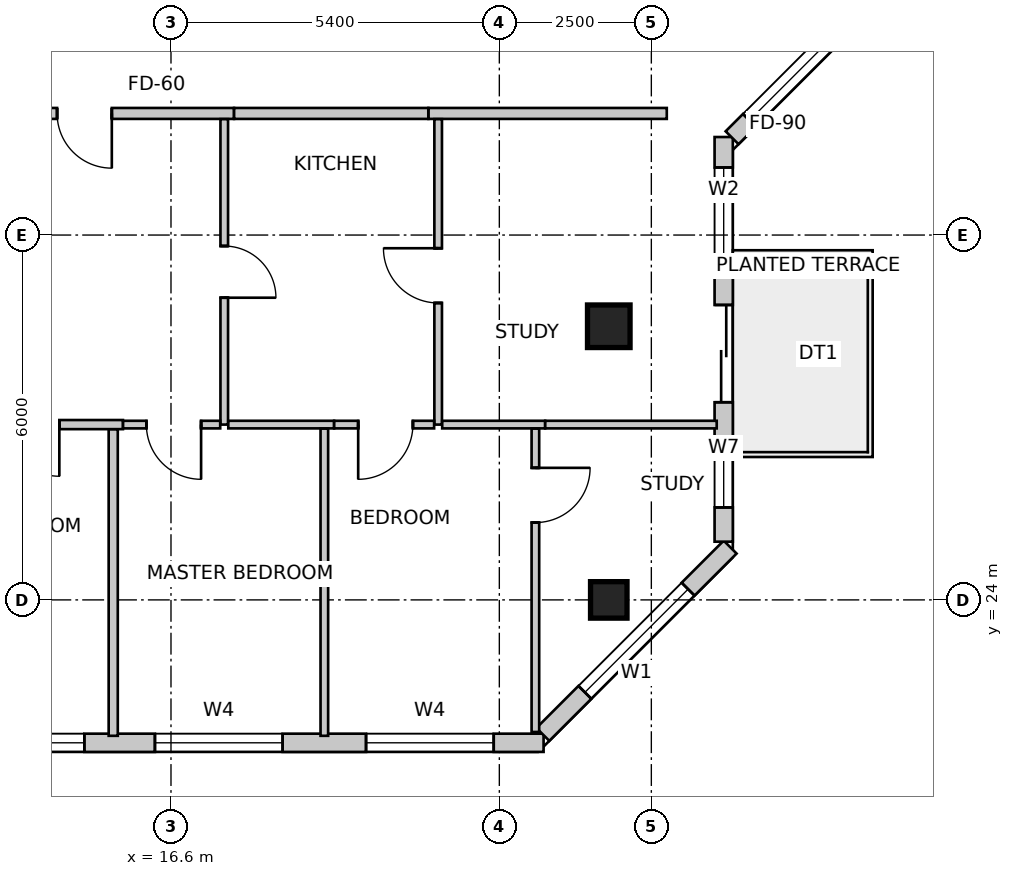
"""IFC4 building model, lengths in metres.
Left out: names, types, materials, properties, quantities, classifications, styles, units other than length and angle.
Written with IfcOpenShell. Run it as: python <this file> out.ifc"""

import sys

from ifc_helpers import new_model, si_unit, direction, frame, frame_2d, origin, origin_2d, place, context, subcontext, project, spatial, rectangle, extrude, source, transform, mapped, element, fill, save


model = new_model("IFC4")
c1 = context("Model", 3, precision=1e-05, world=origin(), true_north=direction((0.0, 1.0)))
c2 = subcontext(c1, "Body", "Model", "MODEL_VIEW")
j1 = project(units=[si_unit("LENGTHUNIT", "METRE"), si_unit("PLANEANGLEUNIT", "RADIAN")], contexts=[c1])
p1 = place(None, origin())
s1 = spatial("IfcSite", under=j1, at=p1, CompositionType="ELEMENT")
p2 = place(p1, origin())
s2 = spatial("IfcBuilding", under=s1, at=p2, CompositionType="ELEMENT")
p3 = place(p2, frame((0.0, 0.0, 285.3)))
s3 = spatial("IfcBuildingStorey", under=s2, at=p3, CompositionType="ELEMENT", Elevation=285.3)
m1 = source(origin(), c2, "Body", "SweptSolid", [
    extrude(rectangle(XDim=0.7, YDim=0.7, at=origin_2d()), origin(), (0.0, 0.0, 1.0), 3.6),
])
p4 = place(p3, frame((23.8, 28.5, 0.0), z_axis=(0.0, 0.0, 1.0), x_axis=(1.0, 0.0, 0.0)))
e1 = element("IfcColumn", 1, at=p4, inside=s3, PredefinedType="COLUMN", context=c2, shape_type="MappedRepresentation", body=[
    mapped(m1, transform((0.0, 0.0, 0.0), scale=1.0)),
])
m2 = source(origin(), c2, "Body", "SweptSolid", [
    extrude(rectangle(XDim=0.6, YDim=0.6, at=origin_2d()), origin(), (0.0, 0.0, 1.0), 3.6),
])
p5 = place(p3, frame((23.8, 24.0, 0.0), z_axis=(0.0, 0.0, 1.0), x_axis=(1.0, 0.0, 0.0)))
e2 = element("IfcColumn", 2, at=p5, inside=s3, PredefinedType="COLUMN", context=c2, shape_type="MappedRepresentation", body=[
    mapped(m2, transform((0.0, 0.0, 0.0), scale=1.0)),
])
p6 = place(p3, frame((12.086, 21.65, 0.0), z_axis=(0.0, 0.0, 1.0), x_axis=(1.0, 0.0, 0.0)))
e3 = element("IfcWall", 3, at=p6, inside=s3, PredefinedType="SOLIDWALL", context=c2, shape_type="SweptSolid", body=[
    extrude(rectangle(XDim=10.642, YDim=0.3, at=frame_2d((5.321, 0.0))), origin(), (0.0, 0.0, 1.0), 3.35),
])
m3 = source(origin(), c2, "Body", "SweptSolid", [
    extrude(rectangle(XDim=1.8, YDim=2.1, at=frame_2d((0.9, 1.05))), frame((0.0, 0.16, 0.0), z_axis=(0.0, -1.0, 0.0), x_axis=(1.0, 0.0, 0.0)), (0.0, 0.0, 1.0), 0.32),
])
p7 = place(p6, frame((1.289, 0.0, 0.85)))
e4 = element("IfcOpeningElement", 4, at=p7, cuts=e3, PredefinedType="OPENING", context=c2, shape_type="MappedRepresentation", body=[
    mapped(m3, transform((0.0, 0.0, 0.0), scale=1.0)),
])
m4 = source(origin(), c2, "Body", "SweptSolid", [
    extrude(rectangle(XDim=2.1, YDim=2.0, at=frame_2d((1.05, 1.0))), frame((0.0, 0.16, 0.0), z_axis=(0.0, -1.0, 0.0), x_axis=(1.0, 0.0, 0.0)), (0.0, 0.0, 1.0), 0.32),
])
p8 = place(p6, frame((4.25, 0.0, 0.85)))
e5 = element("IfcOpeningElement", 5, at=p8, cuts=e3, PredefinedType="OPENING", context=c2, shape_type="MappedRepresentation", body=[
    mapped(m4, transform((0.0, 0.0, 0.0), scale=1.0)),
])
p9 = place(p6, frame((7.722, 0.0, 0.85)))
e6 = element("IfcOpeningElement", 6, at=p9, cuts=e3, PredefinedType="OPENING", context=c2, shape_type="MappedRepresentation", body=[
    mapped(m4, transform((0.0, 0.0, 0.0), scale=1.0)),
])
p10 = place(p3, frame((22.716, 21.788, 0.0), z_axis=(0.0, 0.0, 1.0), x_axis=(0.707134803727, 0.707078757535, 0.0)))
e7 = element("IfcWall", 7, at=p10, inside=s3, PredefinedType="SOLIDWALL", context=c2, shape_type="SweptSolid", body=[
    extrude(rectangle(XDim=4.356, YDim=0.3, at=frame_2d((2.178, 0.0))), origin(), (0.0, 0.0, 1.0), 3.35),
])
m5 = source(origin(), c2, "Body", "SweptSolid", [
    extrude(rectangle(XDim=2.4, YDim=2.2, at=frame_2d((1.2, 1.1))), frame((0.0, 0.16, 0.0), z_axis=(0.0, -1.0, 0.0), x_axis=(1.0, 0.0, 0.0)), (0.0, 0.0, 1.0), 0.32),
])
p11 = place(p10, frame((0.978, 0.0, 0.85)))
e8 = element("IfcOpeningElement", 8, at=p11, cuts=e7, PredefinedType="OPENING", context=c2, shape_type="MappedRepresentation", body=[
    mapped(m5, transform((0.0, 0.0, 0.0), scale=1.0)),
])
p12 = place(p3, frame((25.69, 24.957, 0.0), z_axis=(0.0, 0.0, 1.0), x_axis=(0.0, 1.0, 0.0)))
e9 = element("IfcWall", 9, at=p12, inside=s3, PredefinedType="SOLIDWALL", context=c2, shape_type="SweptSolid", body=[
    extrude(rectangle(XDim=6.655, YDim=0.3, at=frame_2d((3.327, 0.0))), origin(), (0.0, 0.0, 1.0), 3.35),
])
m6 = source(origin(), c2, "Body", "SweptSolid", [
    extrude(rectangle(XDim=1.6, YDim=2.15, at=frame_2d((0.8, 1.075))), frame((0.0, 0.16, 0.0), z_axis=(0.0, -1.0, 0.0), x_axis=(1.0, 0.0, 0.0)), (0.0, 0.0, 1.0), 0.32),
])
p13 = place(p12, frame((2.293, 0.0, 0.0)))
e10 = element("IfcOpeningElement", 10, at=p13, cuts=e9, PredefinedType="OPENING", context=c2, shape_type="MappedRepresentation", body=[
    mapped(m6, transform((0.0, 0.0, 0.0), scale=1.0)),
])
m7 = source(origin(), c2, "Body", "SweptSolid", [
    extrude(rectangle(XDim=0.9, YDim=1.6, at=frame_2d((0.45, 0.8))), frame((0.0, 0.16, 0.0), z_axis=(0.0, -1.0, 0.0), x_axis=(1.0, 0.0, 0.0)), (0.0, 0.0, 1.0), 0.32),
])
p14 = place(p12, frame((0.563, 0.0, 0.85)))
e11 = element("IfcOpeningElement", 11, at=p14, cuts=e9, PredefinedType="OPENING", context=c2, shape_type="MappedRepresentation", body=[
    mapped(m7, transform((0.0, 0.0, 0.0), scale=1.0)),
])
p15 = place(p12, frame((4.354, 0.0, 0.85)))
e12 = element("IfcOpeningElement", 12, at=p15, cuts=e9, PredefinedType="OPENING", context=c2, shape_type="MappedRepresentation", body=[
    mapped(m3, transform((0.0, 0.0, 0.0), scale=1.0)),
])
p16 = place(p3, frame((25.828, 31.6, 0.0), z_axis=(0.0, 0.0, 1.0), x_axis=(0.707106781187, 0.707106781187, 0.0)))
e13 = element("IfcWall", 13, at=p16, inside=s3, PredefinedType="SOLIDWALL", context=c2, shape_type="SweptSolid", body=[
    extrude(rectangle(XDim=2.907, YDim=0.3, at=frame_2d((1.454, 0.0))), origin(), (0.0, 0.0, 1.0), 3.35),
])
p17 = place(p16, frame((0.404, 0.0, 0.85)))
e14 = element("IfcOpeningElement", 14, at=p17, cuts=e13, PredefinedType="OPENING", context=c2, shape_type="MappedRepresentation", body=[
    mapped(m4, transform((0.0, 0.0, 0.0), scale=1.0)),
])
p18 = place(p3, frame((24.754, 32.0, 0.0), z_axis=(0.0, 0.0, 1.0), x_axis=(-1.0, 0.0, 0.0)))
e15 = element("IfcWall", 15, at=p18, inside=s3, PredefinedType="PARTITIONING", context=c2, shape_type="SweptSolid", body=[
    extrude(rectangle(XDim=3.92, YDim=0.18, at=frame_2d((1.96, 0.0))), origin(), (0.0, 0.0, 1.0), 3.019),
])
p19 = place(p3, frame((17.636, 32.0, 0.0), z_axis=(0.0, 0.0, 1.0), x_axis=(-1.0, 0.0, 0.0)))
e16 = element("IfcWall", 16, at=p19, inside=s3, PredefinedType="PARTITIONING", context=c2, shape_type="SweptSolid", body=[
    extrude(rectangle(XDim=5.042, YDim=0.18, at=frame_2d((2.521, 0.0))), origin(), (0.0, 0.0, 1.0), 3.019),
])
m8 = source(origin(), c2, "Body", "SweptSolid", [
    extrude(rectangle(XDim=0.9, YDim=2.15, at=frame_2d((0.45, 1.075))), frame((0.0, 0.1, 0.0), z_axis=(0.0, -1.0, 0.0), x_axis=(1.0, 0.0, 0.0)), (0.0, 0.0, 1.0), 0.2),
])
p20 = place(p19, frame((2.009, 0.0, 0.0)))
e17 = element("IfcOpeningElement", 17, at=p20, cuts=e16, PredefinedType="OPENING", context=c2, shape_type="MappedRepresentation", body=[
    mapped(m8, transform((0.0, 0.0, 0.0), scale=1.0)),
])
p21 = place(p3, frame((20.832, 32.0, 0.0), z_axis=(0.0, 0.0, 1.0), x_axis=(-1.0, 0.0, 0.0)))
e18 = element("IfcWall", 18, at=p21, inside=s3, PredefinedType="PARTITIONING", context=c2, shape_type="SweptSolid", body=[
    extrude(rectangle(XDim=3.194, YDim=0.18, at=frame_2d((1.597, 0.0))), origin(), (0.0, 0.0, 1.0), 3.35),
])
p22 = place(p3, frame((20.994, 26.883, 0.0), z_axis=(0.0, 0.0, 1.0), x_axis=(0.0, 1.0, 0.0)))
e19 = element("IfcWall", 19, at=p22, inside=s3, PredefinedType="PARTITIONING", context=c2, shape_type="SweptSolid", body=[
    extrude(rectangle(XDim=5.023, YDim=0.125, at=frame_2d((2.511, 0.0))), origin(), (0.0, 0.0, 1.0), 2.979),
])
m9 = source(origin(), c2, "Body", "SweptSolid", [
    extrude(rectangle(XDim=0.9, YDim=2.15, at=frame_2d((0.45, 1.075))), frame((0.0, 0.073, 0.0), z_axis=(0.0, -1.0, 0.0), x_axis=(1.0, 0.0, 0.0)), (0.0, 0.0, 1.0), 0.145),
])
p23 = place(p22, frame((2.0, 0.0, 0.0)))
e20 = element("IfcOpeningElement", 20, at=p23, cuts=e19, PredefinedType="OPENING", context=c2, shape_type="MappedRepresentation", body=[
    mapped(m9, transform((0.0, 0.0, 0.0), scale=1.0)),
])
p24 = place(p3, frame((22.753, 26.883, 0.0), z_axis=(0.0, 0.0, 1.0), x_axis=(-1.0, 0.0, 0.0)))
e21 = element("IfcWall", 21, at=p24, inside=s3, PredefinedType="PARTITIONING", context=c2, shape_type="SweptSolid", body=[
    extrude(rectangle(XDim=1.692, YDim=0.125, at=frame_2d((0.846, 0.0))), origin(), (0.0, 0.0, 1.0), 3.35),
])
p25 = place(p3, frame((25.575, 26.883, 0.0), z_axis=(0.0, 0.0, 1.0), x_axis=(-1.0, 0.0, 0.0)))
e22 = element("IfcWall", 22, at=p25, inside=s3, PredefinedType="PARTITIONING", context=c2, shape_type="SweptSolid", body=[
    extrude(rectangle(XDim=2.82, YDim=0.125, at=frame_2d((1.41, 0.0))), origin(), (0.0, 0.0, 1.0), 2.642),
])
p26 = place(p3, frame((17.476, 31.906, 0.0), z_axis=(0.0, 0.0, 1.0), x_axis=(0.0, -1.0, 0.0)))
e23 = element("IfcWall", 23, at=p26, inside=s3, PredefinedType="PARTITIONING", context=c2, shape_type="SweptSolid", body=[
    extrude(rectangle(XDim=5.023, YDim=0.125, at=frame_2d((2.511, 0.0))), origin(), (0.0, 0.0, 1.0), 2.979),
])
m10 = source(origin(), c2, "Body", "SweptSolid", [
    extrude(rectangle(XDim=0.85, YDim=2.15, at=frame_2d((0.425, 1.075))), frame((0.0, 0.073, 0.0), z_axis=(0.0, -1.0, 0.0), x_axis=(1.0, 0.0, 0.0)), (0.0, 0.0, 1.0), 0.145),
])
p27 = place(p26, frame((2.086, 0.0, 0.0)))
e24 = element("IfcOpeningElement", 24, at=p27, cuts=e23, PredefinedType="OPENING", context=c2, shape_type="MappedRepresentation", body=[
    mapped(m10, transform((0.0, 0.0, 0.0), scale=1.0)),
])
p28 = place(p3, frame((15.81, 26.883, 0.0), z_axis=(0.0, 0.0, 1.0), x_axis=(-1.0, 0.0, 0.0)))
e25 = element("IfcWall", 25, at=p28, inside=s3, PredefinedType="PARTITIONING", context=c2, shape_type="SweptSolid", body=[
    extrude(rectangle(XDim=3.07, YDim=0.15, at=frame_2d((1.535, 0.0))), origin(), (0.0, 0.0, 1.0), 3.019),
])
m11 = source(origin(), c2, "Body", "SweptSolid", [
    extrude(rectangle(XDim=0.85, YDim=2.15, at=frame_2d((0.425, 1.075))), frame((0.0, 0.085, 0.0), z_axis=(0.0, -1.0, 0.0), x_axis=(1.0, 0.0, 0.0)), (0.0, 0.0, 1.0), 0.17),
])
p29 = place(p28, frame((1.046, 0.0, 0.0)))
e26 = element("IfcOpeningElement", 26, at=p29, cuts=e25, PredefinedType="OPENING", context=c2, shape_type="MappedRepresentation", body=[
    mapped(m11, transform((0.0, 0.0, 0.0), scale=1.0)),
])
p30 = place(p3, frame((17.409, 26.883, 0.0), z_axis=(0.0, 0.0, 1.0), x_axis=(-1.0, 0.0, 0.0)))
e27 = element("IfcWall", 27, at=p30, inside=s3, PredefinedType="PARTITIONING", context=c2, shape_type="SweptSolid", body=[
    extrude(rectangle(XDim=1.597, YDim=0.125, at=frame_2d((0.799, 0.0))), origin(), (0.0, 0.0, 1.0), 3.019),
])
p31 = place(p30, frame((0.314, 0.0, 0.0)))
e28 = element("IfcOpeningElement", 28, at=p31, cuts=e27, PredefinedType="OPENING", context=c2, shape_type="MappedRepresentation", body=[
    mapped(m9, transform((0.0, 0.0, 0.0), scale=1.0)),
])
p32 = place(p3, frame((19.282, 26.883, 0.0), z_axis=(0.0, 0.0, 1.0), x_axis=(-1.0, 0.0, 0.0)))
e29 = element("IfcWall", 29, at=p32, inside=s3, PredefinedType="PARTITIONING", context=c2, shape_type="SweptSolid", body=[
    extrude(rectangle(XDim=1.74, YDim=0.125, at=frame_2d((0.87, 0.0))), origin(), (0.0, 0.0, 1.0), 3.35),
])
p33 = place(p3, frame((20.927, 26.883, 0.0), z_axis=(0.0, 0.0, 1.0), x_axis=(-1.0, 0.0, 0.0)))
e30 = element("IfcWall", 30, at=p33, inside=s3, PredefinedType="PARTITIONING", context=c2, shape_type="SweptSolid", body=[
    extrude(rectangle(XDim=1.644, YDim=0.125, at=frame_2d((0.822, 0.0))), origin(), (0.0, 0.0, 1.0), 3.35),
])
p34 = place(p33, frame((0.349, 0.0, 0.0)))
e31 = element("IfcOpeningElement", 31, at=p34, cuts=e30, PredefinedType="OPENING", context=c2, shape_type="MappedRepresentation", body=[
    mapped(m9, transform((0.0, 0.0, 0.0), scale=1.0)),
])
p35 = place(p3, frame((15.65, 26.804, 0.0), z_axis=(0.0, 0.0, 1.0), x_axis=(0.0, -1.0, 0.0)))
e32 = element("IfcWall", 32, at=p35, inside=s3, PredefinedType="PARTITIONING", context=c2, shape_type="SweptSolid", body=[
    extrude(rectangle(XDim=5.039, YDim=0.15, at=frame_2d((2.52, 0.0))), origin(), (0.0, 0.0, 1.0), 3.019),
])
p36 = place(p3, frame((19.122, 26.816, 0.0), z_axis=(0.0, 0.0, 1.0), x_axis=(0.0, -1.0, 0.0)))
e33 = element("IfcWall", 33, at=p36, inside=s3, PredefinedType="PARTITIONING", context=c2, shape_type="SweptSolid", body=[
    extrude(rectangle(XDim=5.052, YDim=0.125, at=frame_2d((2.526, 0.0))), origin(), (0.0, 0.0, 1.0), 3.019),
])
p37 = place(p3, frame((22.593, 26.816, 0.0), z_axis=(0.0, 0.0, 1.0), x_axis=(0.0, -1.0, 0.0)))
e34 = element("IfcWall", 34, at=p37, inside=s3, PredefinedType="PARTITIONING", context=c2, shape_type="SweptSolid", body=[
    extrude(rectangle(XDim=4.989, YDim=0.125, at=frame_2d((2.494, 0.0))), origin(), (0.0, 0.0, 1.0), 3.019),
])
p38 = place(p37, frame((0.645, 0.0, 0.0)))
e35 = element("IfcOpeningElement", 35, at=p38, cuts=e34, PredefinedType="OPENING", context=c2, shape_type="MappedRepresentation", body=[
    mapped(m9, transform((0.0, 0.0, 0.0), scale=1.0)),
])
m12 = source(origin(), c2, "Body", "SweptSolid", [
    extrude(rectangle(XDim=1.8, YDim=2.1, at=frame_2d((0.9, 1.05))), frame((0.0, -0.015, 0.0), z_axis=(0.0, -1.0, 0.0), x_axis=(1.0, 0.0, 0.0)), (0.0, 0.0, 1.0), 0.06),
])
p39 = place(p7, origin())
e36 = element("IfcWindow", 36, at=p39, inside=s3, PartitioningType="SINGLE_PANEL", PredefinedType="WINDOW", context=c2, shape_type="MappedRepresentation", body=[
    mapped(m12, transform((0.0, 0.0, 0.0), scale=1.0)),
])
fill(e4, e36)
m13 = source(origin(), c2, "Body", "SweptSolid", [
    extrude(rectangle(XDim=2.1, YDim=2.0, at=frame_2d((1.05, 1.0))), frame((0.0, -0.015, 0.0), z_axis=(0.0, -1.0, 0.0), x_axis=(1.0, 0.0, 0.0)), (0.0, 0.0, 1.0), 0.06),
])
p40 = place(p8, origin())
e37 = element("IfcWindow", 37, at=p40, inside=s3, PartitioningType="SINGLE_PANEL", PredefinedType="WINDOW", context=c2, shape_type="MappedRepresentation", body=[
    mapped(m13, transform((0.0, 0.0, 0.0), scale=1.0)),
])
fill(e5, e37)
p41 = place(p9, origin())
e38 = element("IfcWindow", 38, at=p41, inside=s3, PartitioningType="SINGLE_PANEL", PredefinedType="WINDOW", context=c2, shape_type="MappedRepresentation", body=[
    mapped(m13, transform((0.0, 0.0, 0.0), scale=1.0)),
])
fill(e6, e38)
m14 = source(origin(), c2, "Body", "SweptSolid", [
    extrude(rectangle(XDim=2.4, YDim=2.2, at=frame_2d((1.2, 1.1))), frame((0.0, -0.015, 0.0), z_axis=(0.0, -1.0, 0.0), x_axis=(1.0, 0.0, 0.0)), (0.0, 0.0, 1.0), 0.06),
])
p42 = place(p11, origin())
e39 = element("IfcWindow", 39, at=p42, inside=s3, PartitioningType="SINGLE_PANEL", PredefinedType="WINDOW", context=c2, shape_type="MappedRepresentation", body=[
    mapped(m14, transform((0.0, 0.0, 0.0), scale=1.0)),
])
fill(e8, e39)
m15 = source(origin(), c2, "Body", "SweptSolid", [
    extrude(rectangle(XDim=1.6, YDim=2.15, at=frame_2d((0.8, 1.075))), frame((0.0, 0.025, 0.0), z_axis=(0.0, -1.0, 0.0), x_axis=(1.0, 0.0, 0.0)), (0.0, 0.0, 1.0), 0.05),
])
p43 = place(p13, origin())
e40 = element("IfcDoor", 40, at=p43, inside=s3, OperationType="DOUBLE_DOOR_SLIDING", PredefinedType="DOOR", context=c2, shape_type="MappedRepresentation", body=[
    mapped(m15, transform((0.0, 0.0, 0.0), scale=1.0)),
])
fill(e10, e40)
m16 = source(origin(), c2, "Body", "SweptSolid", [
    extrude(rectangle(XDim=0.9, YDim=1.6, at=frame_2d((0.45, 0.8))), frame((0.0, -0.015, 0.0), z_axis=(0.0, -1.0, 0.0), x_axis=(1.0, 0.0, 0.0)), (0.0, 0.0, 1.0), 0.06),
])
p44 = place(p14, origin())
e41 = element("IfcWindow", 41, at=p44, inside=s3, PartitioningType="SINGLE_PANEL", PredefinedType="WINDOW", context=c2, shape_type="MappedRepresentation", body=[
    mapped(m16, transform((0.0, 0.0, 0.0), scale=1.0)),
])
fill(e11, e41)
p45 = place(p15, origin())
e42 = element("IfcWindow", 42, at=p45, inside=s3, PartitioningType="SINGLE_PANEL", PredefinedType="WINDOW", context=c2, shape_type="MappedRepresentation", body=[
    mapped(m12, transform((0.0, 0.0, 0.0), scale=1.0)),
])
fill(e12, e42)
p46 = place(p17, origin())
e43 = element("IfcWindow", 43, at=p46, inside=s3, PartitioningType="SINGLE_PANEL", PredefinedType="WINDOW", context=c2, shape_type="MappedRepresentation", body=[
    mapped(m13, transform((0.0, 0.0, 0.0), scale=1.0)),
])
fill(e14, e43)
m17 = source(origin(), c2, "Body", "SweptSolid", [
    extrude(rectangle(XDim=0.9, YDim=2.15, at=frame_2d((0.45, 1.075))), frame((0.0, 0.025, 0.0), z_axis=(0.0, -1.0, 0.0), x_axis=(1.0, 0.0, 0.0)), (0.0, 0.0, 1.0), 0.05),
])
p47 = place(p23, origin())
e44 = element("IfcDoor", 44, at=p47, inside=s3, OperationType="SINGLE_SWING_RIGHT", PredefinedType="DOOR", context=c2, shape_type="MappedRepresentation", body=[
    mapped(m17, transform((0.0, 0.0, 0.0), scale=1.0)),
])
fill(e20, e44)
m18 = source(origin(), c2, "Body", "SweptSolid", [
    extrude(rectangle(XDim=0.9, YDim=2.15, at=frame_2d((0.45, 1.075))), frame((0.0, 0.025, 0.0), z_axis=(0.0, -1.0, 0.0), x_axis=(1.0, 0.0, 0.0)), (0.0, 0.0, 1.0), 0.05),
])
p48 = place(p20, origin())
e45 = element("IfcDoor", 45, at=p48, inside=s3, OperationType="SINGLE_SWING_LEFT", PredefinedType="DOOR", context=c2, shape_type="MappedRepresentation", body=[
    mapped(m18, transform((0.0, 0.0, 0.0), scale=1.0)),
])
fill(e17, e45)
m19 = source(origin(), c2, "Body", "SweptSolid", [
    extrude(rectangle(XDim=0.85, YDim=2.15, at=frame_2d((0.425, 1.075))), frame((0.0, 0.025, 0.0), z_axis=(0.0, -1.0, 0.0), x_axis=(1.0, 0.0, 0.0)), (0.0, 0.0, 1.0), 0.05),
])
p49 = place(p27, origin())
e46 = element("IfcDoor", 46, at=p49, inside=s3, OperationType="SINGLE_SWING_RIGHT", PredefinedType="DOOR", context=c2, shape_type="MappedRepresentation", body=[
    mapped(m19, transform((0.0, 0.0, 0.0), scale=1.0)),
])
fill(e24, e46)
p50 = place(p29, origin())
e47 = element("IfcDoor", 47, at=p50, inside=s3, OperationType="SINGLE_SWING_LEFT", PredefinedType="DOOR", context=c2, shape_type="MappedRepresentation", body=[
    mapped(m19, transform((0.0, 0.0, 0.0), scale=1.0)),
])
fill(e26, e47)
p51 = place(p31, origin())
e48 = element("IfcDoor", 48, at=p51, inside=s3, OperationType="SINGLE_SWING_LEFT", PredefinedType="DOOR", context=c2, shape_type="MappedRepresentation", body=[
    mapped(m17, transform((0.0, 0.0, 0.0), scale=1.0)),
])
fill(e28, e48)
p52 = place(p34, origin())
e49 = element("IfcDoor", 49, at=p52, inside=s3, OperationType="SINGLE_SWING_RIGHT", PredefinedType="DOOR", context=c2, shape_type="MappedRepresentation", body=[
    mapped(m17, transform((0.0, 0.0, 0.0), scale=1.0)),
])
fill(e31, e49)
p53 = place(p38, origin())
e50 = element("IfcDoor", 50, at=p53, inside=s3, OperationType="SINGLE_SWING_LEFT", PredefinedType="DOOR", context=c2, shape_type="MappedRepresentation", body=[
    mapped(m17, transform((0.0, 0.0, 0.0), scale=1.0)),
])
fill(e35, e50)
save(model, sys.argv[1])
